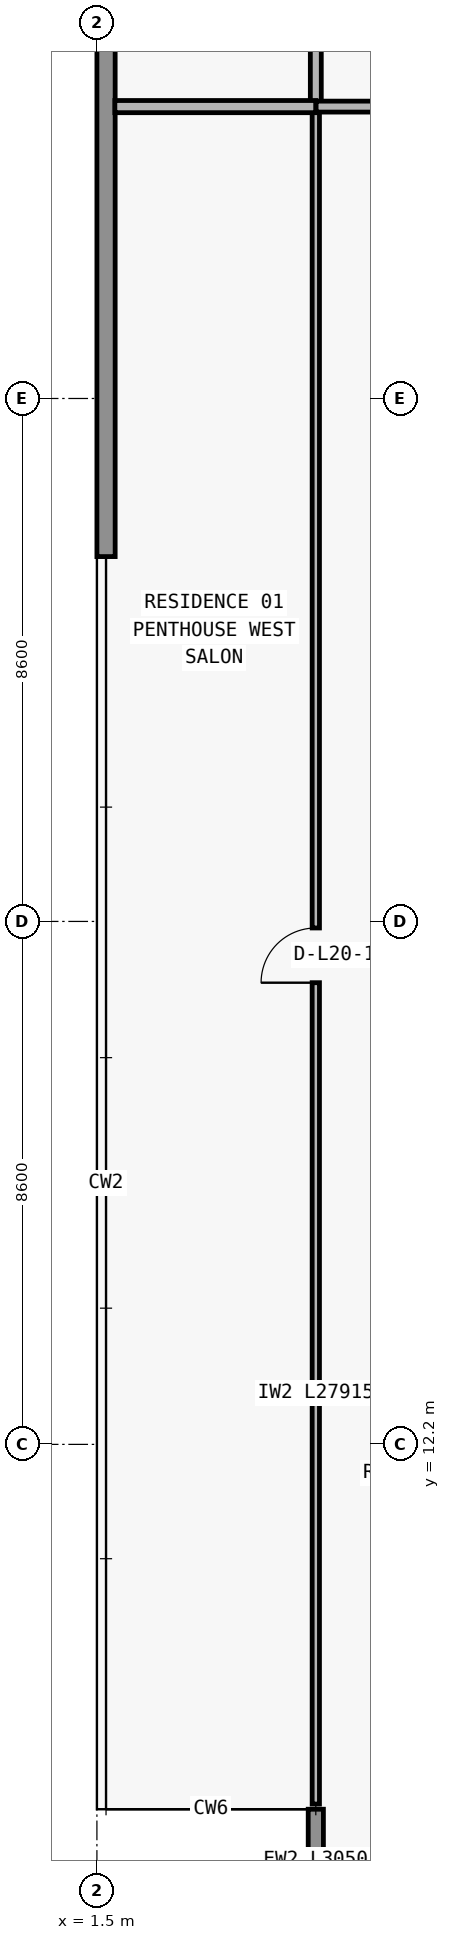
"""IFC4 building model, lengths in metres.
Left out: names, types, materials, properties, quantities, classifications, styles, units other than length and angle.
Written with IfcOpenShell. Run it as: python <this file> out.ifc"""

import sys

from ifc_helpers import new_model, si_unit, direction, frame, frame_2d, origin, place, context, subcontext, project, spatial, rectangle, extrude, element, fill, save


model = new_model("IFC4")
c1 = context("Model", 3, precision=1e-05, world=origin(), true_north=direction((0.0, 1.0)))
c2 = subcontext(c1, "Body", "Model", "MODEL_VIEW")
j1 = project(units=[si_unit("LENGTHUNIT", "METRE"), si_unit("PLANEANGLEUNIT", "RADIAN")], contexts=[c1])
p1 = place(None, origin())
s1 = spatial("IfcSite", under=j1, at=p1, CompositionType="ELEMENT")
p2 = place(p1, origin())
s2 = spatial("IfcBuilding", under=s1, at=p2, CompositionType="ELEMENT")
p3 = place(p2, frame((0.0, 0.0, 76.2)))
s3 = spatial("IfcBuildingStorey", under=s2, at=p3, CompositionType="ELEMENT", Elevation=76.2)
p4 = place(p3, frame((5.1, 6.2, 0.0), z_axis=(0.0, 0.0, 1.0), x_axis=(0.0, -1.0, 0.0)))
e1 = element("IfcWall", 1, at=p4, inside=s3, PredefinedType="ELEMENTEDWALL", context=c2, shape_type="SweptSolid", body=[
    extrude(rectangle(XDim=3.05, YDim=0.25, at=frame_2d((1.525, 0.0))), origin(), (0.0, 0.0, 1.0), 3.0),
])
p5 = place(p3, frame((1.65, 26.8, 0.0), z_axis=(0.0, 0.0, 1.0), x_axis=(0.0, 1.0, 0.0)))
e2 = element("IfcWall", 2, at=p5, inside=s3, PredefinedType="STANDARD", context=c2, shape_type="SweptSolid", body=[
    extrude(rectangle(XDim=20.6, YDim=0.3, at=frame_2d((10.3, 0.0))), origin(), (0.0, 0.0, 1.0), 3.0),
])
p6 = place(p3, frame((5.1, 6.285, 0.0), z_axis=(0.0, 0.0, 1.0), x_axis=(0.0, 1.0, 0.0)))
e3 = element("IfcWall", 3, at=p6, inside=s3, PredefinedType="PARTITIONING", context=c2, shape_type="SweptSolid", body=[
    extrude(rectangle(XDim=27.915, YDim=0.12, at=frame_2d((13.958, 0.0))), origin(), (0.0, 0.0, 1.0), 3.0),
])
p7 = place(p6, frame((13.508, 0.0, 0.0)))
e4 = element("IfcOpeningElement", 4, at=p7, cuts=e3, PredefinedType="OPENING", context=c2, shape_type="SweptSolid", body=[
    extrude(rectangle(XDim=0.9, YDim=2.15, at=frame_2d((0.45, 1.075))), frame((0.0, 0.07, 0.0), z_axis=(0.0, -1.0, 0.0), x_axis=(1.0, 0.0, 0.0)), (0.0, 0.0, 1.0), 0.14),
])
p8 = place(p3, frame((5.1, 34.205, 0.0), z_axis=(0.0, 0.0, 1.0), x_axis=(0.0, 1.0, 0.0)))
e5 = element("IfcWall", 5, at=p8, inside=s3, PredefinedType="PARTITIONING", context=c2, shape_type="SweptSolid", body=[
    extrude(rectangle(XDim=2.695, YDim=0.18, at=frame_2d((1.347, 0.0))), origin(), (0.0, 0.0, 1.0), 3.0),
])
p9 = place(p3, frame((1.795, 34.2, 0.0), z_axis=(0.0, 0.0, 1.0), x_axis=(1.0, 0.0, 0.0)))
e6 = element("IfcWall", 6, at=p9, inside=s3, PredefinedType="PARTITIONING", context=c2, shape_type="SweptSolid", body=[
    extrude(rectangle(XDim=3.305, YDim=0.2, at=frame_2d((1.653, 0.0))), origin(), (0.0, 0.0, 1.0), 3.0),
])
p10 = place(p3, frame((5.105, 34.2, 0.0), z_axis=(0.0, 0.0, 1.0), x_axis=(1.0, 0.0, 0.0)))
e7 = element("IfcWall", 7, at=p10, inside=s3, PredefinedType="PARTITIONING", context=c2, shape_type="SweptSolid", body=[
    extrude(rectangle(XDim=67.595, YDim=0.18, at=frame_2d((33.797, 0.0))), origin(), (0.0, 0.0, 1.0), 3.0),
])
p11 = place(p10, frame((7.639, 0.0, 0.0)))
e8 = element("IfcOpeningElement", 8, at=p11, cuts=e7, PredefinedType="OPENING", context=c2, shape_type="SweptSolid", body=[
    extrude(rectangle(XDim=1.0, YDim=2.2, at=frame_2d((0.5, 1.1))), frame((0.0, 0.1, 0.0), z_axis=(0.0, -1.0, 0.0), x_axis=(1.0, 0.0, 0.0)), (0.0, 0.0, 1.0), 0.2),
])
p12 = place(p10, frame((24.423, 0.0, 0.0)))
e9 = element("IfcOpeningElement", 9, at=p12, cuts=e7, PredefinedType="OPENING", context=c2, shape_type="SweptSolid", body=[
    extrude(rectangle(XDim=1.0, YDim=2.2, at=frame_2d((0.5, 1.1))), frame((0.0, 0.1, 0.0), z_axis=(0.0, -1.0, 0.0), x_axis=(1.0, 0.0, 0.0)), (0.0, 0.0, 1.0), 0.2),
])
p13 = place(p10, frame((48.825, 0.0, 0.0)))
e10 = element("IfcOpeningElement", 10, at=p13, cuts=e7, PredefinedType="OPENING", context=c2, shape_type="SweptSolid", body=[
    extrude(rectangle(XDim=1.0, YDim=2.2, at=frame_2d((0.5, 1.1))), frame((0.0, 0.1, 0.0), z_axis=(0.0, -1.0, 0.0), x_axis=(1.0, 0.0, 0.0)), (0.0, 0.0, 1.0), 0.2),
])
p14 = place(p7, origin())
e11 = element("IfcDoor", 11, at=p14, inside=s3, OperationType="SINGLE_SWING_LEFT", PredefinedType="DOOR", context=c2, shape_type="SweptSolid", body=[
    extrude(rectangle(XDim=0.9, YDim=2.15, at=frame_2d((0.45, 1.075))), frame((0.0, 0.025, 0.0), z_axis=(0.0, -1.0, 0.0), x_axis=(1.0, 0.0, 0.0)), (0.0, 0.0, 1.0), 0.05),
])
fill(e4, e11)
save(model, sys.argv[1])
